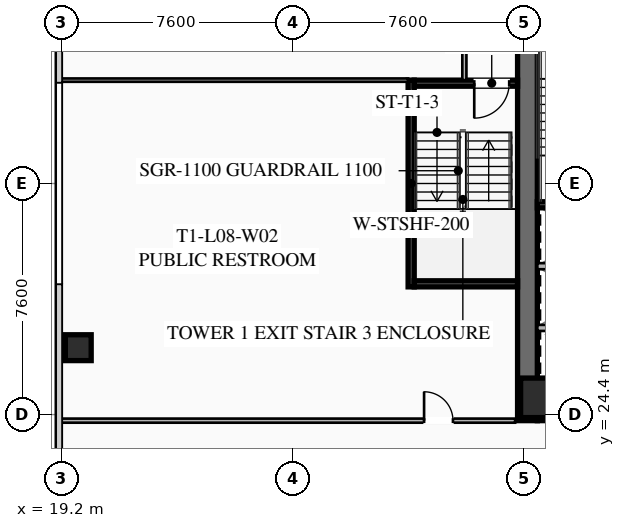
"""IFC4 building model, lengths in metres.
Left out: names, types, materials, properties, quantities, classifications, styles, units other than length and angle.
Written with IfcOpenShell. Run it as: python <this file> out.ifc"""

import sys

from ifc_helpers import new_model, si_unit, direction, frame, frame_2d, origin, origin_2d, place, context, subcontext, project, spatial, rectangle, hollow_rectangle, extrude, element, fill, save


model = new_model("IFC4")
c1 = context("Model", 3, precision=1e-05, world=origin(), true_north=direction((0.0, 1.0)))
c2 = subcontext(c1, "Body", "Model", "MODEL_VIEW")
j1 = project(units=[si_unit("LENGTHUNIT", "METRE"), si_unit("PLANEANGLEUNIT", "RADIAN")], contexts=[c1])
p1 = place(None, origin())
s1 = spatial("IfcSite", under=j1, at=p1, CompositionType="ELEMENT")
p2 = place(p1, origin())
s2 = spatial("IfcBuilding", under=s1, at=p2, CompositionType="ELEMENT")
p3 = place(p2, frame((0.0, 0.0, 35.25)))
s3 = spatial("IfcBuildingStorey", under=s2, at=p3, CompositionType="ELEMENT", Elevation=35.25)
p4 = place(p3, frame((34.525, 24.2, 0.0), z_axis=(0.0, 0.0, 1.0), x_axis=(0.0, 1.0, 0.0)))
e1 = element("IfcWall", 1, at=p4, inside=s3, PredefinedType="SHEAR", context=c2, shape_type="SweptSolid", body=[
    extrude(rectangle(XDim=15.6, YDim=0.65, at=frame_2d((7.8, 0.0))), origin(), (0.0, 0.0, 1.0), 3.55),
])
p5 = place(p3, frame((49.15, 24.525, 0.0), z_axis=(0.0, 0.0, 1.0), x_axis=(-1.0, 0.0, 0.0)))
e2 = element("IfcWall", 2, at=p5, inside=s3, PredefinedType="SHEAR", context=c2, shape_type="SweptSolid", body=[
    extrude(rectangle(XDim=14.3, YDim=0.65, at=frame_2d((7.15, 0.0))), origin(), (0.0, 0.0, 1.0), 3.55),
])
p6 = place(p5, frame((8.85, 0.0, 0.0)))
e3 = element("IfcOpeningElement", 3, at=p6, cuts=e2, PredefinedType="OPENING", context=c2, shape_type="SweptSolid", body=[
    extrude(rectangle(XDim=1.25, YDim=2.25, at=frame_2d((0.625, 1.125))), frame((0.0, 0.335, 0.0), z_axis=(0.0, -1.0, 0.0), x_axis=(1.0, 0.0, 0.0)), (0.0, 0.0, 1.0), 0.67),
])
p7 = place(p5, frame((3.8, 0.0, 0.0)))
e4 = element("IfcOpeningElement", 4, at=p7, cuts=e2, PredefinedType="OPENING", context=c2, shape_type="SweptSolid", body=[
    extrude(rectangle(XDim=1.25, YDim=2.25, at=frame_2d((0.625, 1.125))), frame((0.0, 0.335, 0.0), z_axis=(0.0, -1.0, 0.0), x_axis=(1.0, 0.0, 0.0)), (0.0, 0.0, 1.0), 0.67),
])
p8 = place(p3, frame((34.95, 24.95, 0.0), z_axis=(0.0, 0.0, 1.0), x_axis=(1.0, 0.0, 0.0)))
e5 = element("IfcColumn", 5, at=p8, inside=s3, PredefinedType="COLUMN", context=c2, shape_type="SweptSolid", body=[
    extrude(hollow_rectangle(XDim=1.3, YDim=1.3, WallThickness=0.05, at=origin_2d()), origin(), (0.0, 0.0, 1.0), 3.35),
])
p9 = place(p3, frame((19.75, 26.6, 0.0), z_axis=(0.0, 0.0, 1.0), x_axis=(1.0, 0.0, 0.0)))
e6 = element("IfcColumn", 6, at=p9, inside=s3, PredefinedType="COLUMN", context=c2, shape_type="SweptSolid", body=[
    extrude(hollow_rectangle(XDim=0.85, YDim=0.85, WallThickness=0.035, at=origin_2d()), origin(), (0.0, 0.0, 1.0), 3.35),
])
p10 = place(p3, frame((34.85, 31.3, 0.0), z_axis=(0.0, 0.0, 1.0), x_axis=(1.0, 0.0, 0.0)))
e7 = element("IfcWall", 7, at=p10, inside=s3, PredefinedType="SHEAR", context=c2, shape_type="SweptSolid", body=[
    extrude(rectangle(XDim=3.45, YDim=0.2, at=frame_2d((1.725, 0.0))), origin(), (0.0, 0.0, 1.0), 3.35),
])
for number, where, z_axis, x_axis in (
    (8, (34.85, 27.25, 0.0), (0.0, 0.0, 1.0), (1.0, 0.0, 0.0)),
    (9, (34.85, 29.28, 0.0), (0.0, 0.0, 1.0), (1.0, 0.0, 0.0)),
):
    element("IfcWall", number, at=place(p3, frame(where, z_axis=z_axis, x_axis=x_axis)), inside=s3, PredefinedType="SOLIDWALL", context=c2, shape_type="SweptSolid", body=[
        extrude(rectangle(XDim=3.1, YDim=0.2, at=frame_2d((1.55, 0.0))), origin(), (0.0, 0.0, 1.0), 3.35),
    ])
p11 = place(p3, frame((30.7, 28.6, 0.0), z_axis=(0.0, 0.0, 1.0), x_axis=(0.0, 1.0, 0.0)))
e10 = element("IfcWall", 10, at=p11, inside=s3, PredefinedType="SHEAR", context=c2, shape_type="SweptSolid", body=[
    extrude(rectangle(XDim=6.8, YDim=0.2, at=frame_2d((3.4, 0.0))), origin(), (0.0, 0.0, 1.0), 3.35),
])
p12 = place(p3, frame((34.2, 35.3, 0.0), z_axis=(0.0, 0.0, 1.0), x_axis=(-1.0, 0.0, 0.0)))
e11 = element("IfcWall", 11, at=p12, inside=s3, PredefinedType="SHEAR", context=c2, shape_type="SweptSolid", body=[
    extrude(rectangle(XDim=3.4, YDim=0.2, at=frame_2d((1.7, 0.0))), origin(), (0.0, 0.0, 1.0), 3.35),
])
p13 = place(p12, frame((0.275, 0.0, 0.0)))
e12 = element("IfcOpeningElement", 12, at=p13, cuts=e11, PredefinedType="OPENING", context=c2, shape_type="SweptSolid", body=[
    extrude(rectangle(XDim=1.15, YDim=2.2, at=frame_2d((0.575, 1.1))), frame((0.0, 0.11, 0.0), z_axis=(0.0, -1.0, 0.0), x_axis=(1.0, 0.0, 0.0)), (0.0, 0.0, 1.0), 0.22),
])
p14 = place(p3, frame((30.8, 28.7, 0.0), z_axis=(0.0, 0.0, 1.0), x_axis=(1.0, 0.0, 0.0)))
e13 = element("IfcWall", 13, at=p14, inside=s3, PredefinedType="SHEAR", context=c2, shape_type="SweptSolid", body=[
    extrude(rectangle(XDim=3.4, YDim=0.2, at=frame_2d((1.7, 0.0))), origin(), (0.0, 0.0, 1.0), 3.35),
])
p15 = place(p3, frame((32.45, 35.4, 0.0), z_axis=(0.0, 0.0, 1.0), x_axis=(0.0, 1.0, 0.0)))
e14 = element("IfcWall", 14, at=p15, inside=s3, PredefinedType="PARTITIONING", context=c2, shape_type="SweptSolid", body=[
    extrude(rectangle(XDim=4.4, YDim=0.135, at=frame_2d((2.2, 0.0))), origin(), (0.0, 0.0, 1.0), 2.703),
])
p16 = place(p3, frame((19.12, 24.2, 0.0), z_axis=(0.0, 0.0, 1.0), x_axis=(1.0, 0.0, 0.0)))
e15 = element("IfcWall", 15, at=p16, inside=s3, PredefinedType="PARTITIONING", context=c2, shape_type="SweptSolid", body=[
    extrude(rectangle(XDim=15.0, YDim=0.135, at=frame_2d((7.5, 0.0))), origin(), (0.0, 0.0, 1.0), 2.703),
])
p17 = place(p16, frame((12.005, 0.0, 0.0)))
e16 = element("IfcOpeningElement", 16, at=p17, cuts=e15, PredefinedType="OPENING", context=c2, shape_type="SweptSolid", body=[
    extrude(rectangle(XDim=0.95, YDim=2.05, at=frame_2d((0.475, 1.025))), frame((0.0, 0.077, 0.0), z_axis=(0.0, -1.0, 0.0), x_axis=(1.0, 0.0, 0.0)), (0.0, 0.0, 1.0), 0.155),
])
p18 = place(p3, frame((30.6, 35.4, 0.0), z_axis=(0.0, 0.0, 1.0), x_axis=(-1.0, 0.0, 0.0)))
e17 = element("IfcWall", 17, at=p18, inside=s3, PredefinedType="PARTITIONING", context=c2, shape_type="SweptSolid", body=[
    extrude(rectangle(XDim=11.48, YDim=0.11, at=frame_2d((5.74, 0.0))), origin(), (0.0, 0.0, 1.0), 2.703),
])
p19 = place(p13, origin())
e18 = element("IfcDoor", 18, at=p19, inside=s3, OperationType="SINGLE_SWING_RIGHT", PredefinedType="DOOR", context=c2, shape_type="SweptSolid", body=[
    extrude(rectangle(XDim=1.15, YDim=2.2, at=frame_2d((0.575, 1.1))), frame((0.0, 0.025, 0.0), z_axis=(0.0, -1.0, 0.0), x_axis=(1.0, 0.0, 0.0)), (0.0, 0.0, 1.0), 0.05),
])
fill(e12, e18)
p20 = place(p17, origin())
e19 = element("IfcDoor", 19, at=p20, inside=s3, OperationType="SINGLE_SWING_LEFT", PredefinedType="DOOR", context=c2, shape_type="SweptSolid", body=[
    extrude(rectangle(XDim=0.95, YDim=2.05, at=frame_2d((0.475, 1.025))), frame((0.0, 0.025, 0.0), z_axis=(0.0, -1.0, 0.0), x_axis=(1.0, 0.0, 0.0)), (0.0, 0.0, 1.0), 0.05),
])
fill(e16, e19)
save(model, sys.argv[1])
